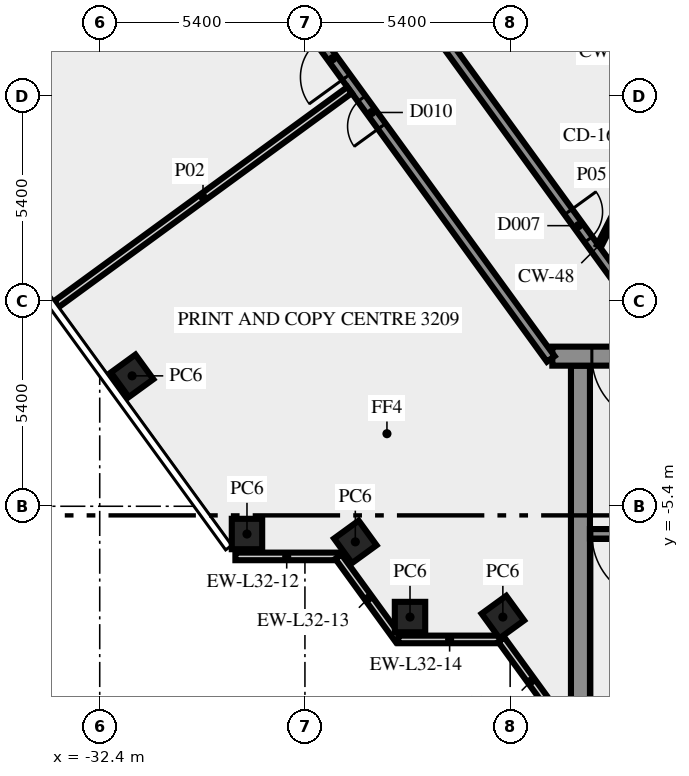
"""IFC4 building model, lengths in metres.
Left out: names, types, materials, properties, quantities, classifications, styles, units other than length and angle.
Written with IfcOpenShell. Run it as: python <this file> out.ifc"""

import sys

from ifc_helpers import new_model, si_unit, direction, frame, frame_2d, origin, origin_2d, place, context, subcontext, project, spatial, rectangle, extrude, element, fill, save


model = new_model("IFC4")
c1 = context("Model", 3, precision=1e-05, world=origin(), true_north=direction((0.0, 1.0)))
c2 = subcontext(c1, "Body", "Model", "MODEL_VIEW")
j1 = project(units=[si_unit("LENGTHUNIT", "METRE"), si_unit("PLANEANGLEUNIT", "RADIAN")], contexts=[c1])
p1 = place(None, origin())
s1 = spatial("IfcSite", under=j1, at=p1, CompositionType="ELEMENT")
p2 = place(p1, origin())
s2 = spatial("IfcBuilding", under=s1, at=p2, CompositionType="ELEMENT")
p3 = place(p2, frame((0.0, 0.0, 139.0)))
s3 = spatial("IfcBuildingStorey", under=s2, at=p3, CompositionType="ELEMENT", Elevation=139.0)
for number, where, z_axis, x_axis in (
    (1, (-31.548, -1.969, 0.0), (0.0, 0.0, 1.0), (0.588, -0.809, 0.0)),
    (2, (-28.525, -6.13, 0.0), (0.0, 0.0, 1.0), (1.0, 0.0, 0.0)),
    (3, (-25.674, -6.337, 0.0), (0.0, 0.0, 1.0), (0.588, -0.809, 0.0)),
    (4, (-24.235, -8.315, 0.0), (0.0, 0.0, 1.0), (1.0, 0.0, 0.0)),
    (5, (-21.792, -8.315, 0.0), (0.0, 0.0, 1.0), (0.588, -0.809, 0.0)),
):
    element("IfcColumn", number, at=place(p3, frame(where, z_axis=z_axis, x_axis=x_axis)), inside=s3, PredefinedType="COLUMN", context=c2, shape_type="SweptSolid", body=[
        extrude(rectangle(XDim=0.8, YDim=0.8, at=origin_2d()), origin(), (0.0, 0.0, 1.0), 4.65),
    ])
p4 = place(p3, frame((-28.83, -6.719, 0.0), z_axis=(0.0, 0.0, 1.0), x_axis=(1.0, 0.0, 0.0)))
e6 = element("IfcWall", 6, at=p4, inside=s3, PredefinedType="SOLIDWALL", context=c2, shape_type="SweptSolid", body=[
    extrude(rectangle(XDim=2.7, YDim=0.2, at=frame_2d((1.35, 0.0))), origin(), (0.0, 0.0, 1.0), 4.65),
])
p5 = place(p3, frame((-26.12, -6.724, 0.0), z_axis=(0.0, 0.0, 1.0), x_axis=(0.587720002413, -0.809064397168, 0.0)))
e7 = element("IfcWall", 7, at=p5, inside=s3, PredefinedType="SOLIDWALL", context=c2, shape_type="SweptSolid", body=[
    extrude(rectangle(XDim=2.7, YDim=0.2, at=frame_2d((1.35, 0.0))), origin(), (0.0, 0.0, 1.0), 4.65),
])
p6 = place(p3, frame((-24.543, -8.904, 0.0), z_axis=(0.0, 0.0, 1.0), x_axis=(1.0, 0.0, 0.0)))
e8 = element("IfcWall", 8, at=p6, inside=s3, PredefinedType="SOLIDWALL", context=c2, shape_type="SweptSolid", body=[
    extrude(rectangle(XDim=2.7, YDim=0.2, at=frame_2d((1.35, 0.0))), origin(), (0.0, 0.0, 1.0), 4.65),
])
p7 = place(p3, frame((-21.833, -8.909, 0.0), z_axis=(0.0, 0.0, 1.0), x_axis=(0.587766567315, -0.809030569476, 0.0)))
e9 = element("IfcWall", 9, at=p7, inside=s3, PredefinedType="SOLIDWALL", context=c2, shape_type="SweptSolid", body=[
    extrude(rectangle(XDim=2.688, YDim=0.2, at=frame_2d((1.344, 0.0))), origin(), (0.0, 0.0, 1.0), 4.65),
])
p8 = place(p3, frame((-19.75, -10.5, 0.0), z_axis=(0.0, 0.0, 1.0), x_axis=(0.0, 1.0, 0.0)))
e10 = element("IfcWall", 10, at=p8, inside=s3, PredefinedType="SHEAR", context=c2, shape_type="SweptSolid", body=[
    extrude(rectangle(XDim=8.8, YDim=0.5, at=frame_2d((4.4, 0.0))), origin(), (0.0, 0.0, 1.0), 4.65),
])
p9 = place(p3, frame((-11.45, -6.125, 0.0), z_axis=(0.0, 0.0, 1.0), x_axis=(-1.0, 0.0, 0.0)))
e11 = element("IfcWall", 11, at=p9, inside=s3, PredefinedType="SHEAR", context=c2, shape_type="SweptSolid", body=[
    extrude(rectangle(XDim=8.05, YDim=0.25, at=frame_2d((4.025, 0.0))), origin(), (0.0, 0.0, 1.0), 4.65),
])
p10 = place(p9, frame((6.2, 0.0, 0.0)))
e12 = element("IfcOpeningElement", 12, at=p10, cuts=e11, PredefinedType="OPENING", context=c2, shape_type="SweptSolid", body=[
    extrude(rectangle(XDim=1.8, YDim=2.1, at=frame_2d((0.9, 1.05))), frame((0.0, 0.135, 0.0), z_axis=(0.0, -1.0, 0.0), x_axis=(1.0, 0.0, 0.0)), (0.0, 0.0, 1.0), 0.27),
])
p11 = place(p3, frame((20.49, -1.45, 0.0), z_axis=(0.0, 0.0, 1.0), x_axis=(-1.0, 0.0, 0.0)))
e13 = element("IfcWall", 13, at=p11, inside=s3, PredefinedType="SHEAR", context=c2, shape_type="SweptSolid", body=[
    extrude(rectangle(XDim=40.98, YDim=0.5, at=frame_2d((20.49, 0.0))), origin(), (0.0, 0.0, 1.0), 4.65),
])
p12 = place(p11, frame((38.14, 0.0, 0.0)))
e14 = element("IfcOpeningElement", 14, at=p12, cuts=e13, PredefinedType="OPENING", context=c2, shape_type="SweptSolid", body=[
    extrude(rectangle(XDim=1.8, YDim=2.1, at=frame_2d((0.9, 1.05))), frame((0.0, 0.26, 0.0), z_axis=(0.0, -1.0, 0.0), x_axis=(1.0, 0.0, 0.0)), (0.0, 0.0, 1.0), 0.52),
])
p13 = place(p11, frame((35.89, 0.0, 0.0)))
e15 = element("IfcOpeningElement", 15, at=p13, cuts=e13, PredefinedType="OPENING", context=c2, shape_type="SweptSolid", body=[
    extrude(rectangle(XDim=0.9, YDim=2.1, at=frame_2d((0.45, 1.05))), frame((0.0, 0.26, 0.0), z_axis=(0.0, -1.0, 0.0), x_axis=(1.0, 0.0, 0.0)), (0.0, 0.0, 1.0), 0.52),
])
p14 = place(p11, frame((32.94, 0.0, 0.0)))
e16 = element("IfcOpeningElement", 16, at=p14, cuts=e13, PredefinedType="OPENING", context=c2, shape_type="SweptSolid", body=[
    extrude(rectangle(XDim=0.9, YDim=2.1, at=frame_2d((0.45, 1.05))), frame((0.0, 0.26, 0.0), z_axis=(0.0, -1.0, 0.0), x_axis=(1.0, 0.0, 0.0)), (0.0, 0.0, 1.0), 0.52),
])
p15 = place(p11, frame((21.765, 0.0, 0.0)))
e17 = element("IfcOpeningElement", 17, at=p15, cuts=e13, PredefinedType="OPENING", context=c2, shape_type="SweptSolid", body=[
    extrude(rectangle(XDim=2.0, YDim=2.1, at=frame_2d((1.0, 1.05))), frame((0.0, 0.26, 0.0), z_axis=(0.0, -1.0, 0.0), x_axis=(1.0, 0.0, 0.0)), (0.0, 0.0, 1.0), 0.52),
])
p16 = place(p11, frame((7.14, 0.0, 0.0)))
e18 = element("IfcOpeningElement", 18, at=p16, cuts=e13, PredefinedType="OPENING", context=c2, shape_type="SweptSolid", body=[
    extrude(rectangle(XDim=0.9, YDim=2.1, at=frame_2d((0.45, 1.05))), frame((0.0, 0.26, 0.0), z_axis=(0.0, -1.0, 0.0), x_axis=(1.0, 0.0, 0.0)), (0.0, 0.0, 1.0), 0.52),
])
p17 = place(p11, frame((5.028, 0.0, 0.0)))
e19 = element("IfcOpeningElement", 19, at=p17, cuts=e13, PredefinedType="OPENING", context=c2, shape_type="SweptSolid", body=[
    extrude(rectangle(XDim=0.8, YDim=2.1, at=frame_2d((0.4, 1.05))), frame((0.0, 0.26, 0.0), z_axis=(0.0, -1.0, 0.0), x_axis=(1.0, 0.0, 0.0)), (0.0, 0.0, 1.0), 0.52),
])
p18 = place(p11, frame((3.452, 0.0, 0.0)))
e20 = element("IfcOpeningElement", 20, at=p18, cuts=e13, PredefinedType="OPENING", context=c2, shape_type="SweptSolid", body=[
    extrude(rectangle(XDim=0.8, YDim=2.1, at=frame_2d((0.4, 1.05))), frame((0.0, 0.26, 0.0), z_axis=(0.0, -1.0, 0.0), x_axis=(1.0, 0.0, 0.0)), (0.0, 0.0, 1.0), 0.52),
])
p19 = place(p11, frame((1.04, 0.0, 0.0)))
e21 = element("IfcOpeningElement", 21, at=p19, cuts=e13, PredefinedType="OPENING", context=c2, shape_type="SweptSolid", body=[
    extrude(rectangle(XDim=1.8, YDim=2.1, at=frame_2d((0.9, 1.05))), frame((0.0, 0.26, 0.0), z_axis=(0.0, -1.0, 0.0), x_axis=(1.0, 0.0, 0.0)), (0.0, 0.0, 1.0), 0.52),
])
p20 = place(p3, frame((-20.531, -1.523, 0.0), z_axis=(0.0, 0.0, 1.0), x_axis=(-0.587781654618, 0.809019608226, 0.0)))
e22 = element("IfcWall", 22, at=p20, inside=s3, PredefinedType="SOLIDWALL", context=c2, shape_type="SweptSolid", body=[
    extrude(rectangle(XDim=33.911, YDim=0.25, at=frame_2d((16.956, 0.0))), origin(), (0.0, 0.0, 1.0), 4.65),
])
p21 = place(p20, frame((9.166, 0.0, 0.0)))
e23 = element("IfcOpeningElement", 23, at=p21, cuts=e22, PredefinedType="OPENING", context=c2, shape_type="SweptSolid", body=[
    extrude(rectangle(XDim=1.2, YDim=2.1, at=frame_2d((0.6, 1.05))), frame((0.0, 0.135, 0.0), z_axis=(0.0, -1.0, 0.0), x_axis=(1.0, 0.0, 0.0)), (0.0, 0.0, 1.0), 0.27),
])
p22 = place(p20, frame((7.566, 0.0, 0.0)))
e24 = element("IfcOpeningElement", 24, at=p22, cuts=e22, PredefinedType="OPENING", context=c2, shape_type="SweptSolid", body=[
    extrude(rectangle(XDim=0.9, YDim=2.1, at=frame_2d((0.45, 1.05))), frame((0.0, 0.135, 0.0), z_axis=(0.0, -1.0, 0.0), x_axis=(1.0, 0.0, 0.0)), (0.0, 0.0, 1.0), 0.27),
])
p23 = place(p3, frame((-38.32, 27.469, 0.0), z_axis=(0.0, 0.0, 1.0), x_axis=(0.587788021768, -0.809014982226, 0.0)))
e25 = element("IfcWall", 25, at=p23, inside=s3, PredefinedType="SOLIDWALL", context=c2, shape_type="SweptSolid", body=[
    extrude(rectangle(XDim=35.344, YDim=0.25, at=frame_2d((17.672, 0.0))), origin(), (0.0, 0.0, 1.0), 4.65),
])
p24 = place(p23, frame((31.052, 0.0, 0.0)))
e26 = element("IfcOpeningElement", 26, at=p24, cuts=e25, PredefinedType="OPENING", context=c2, shape_type="SweptSolid", body=[
    extrude(rectangle(XDim=0.9, YDim=2.1, at=frame_2d((0.45, 1.05))), frame((0.0, 0.135, 0.0), z_axis=(0.0, -1.0, 0.0), x_axis=(1.0, 0.0, 0.0)), (0.0, 0.0, 1.0), 0.27),
])
p25 = place(p23, frame((0.392, 0.0, 0.0)))
e27 = element("IfcOpeningElement", 27, at=p25, cuts=e25, PredefinedType="OPENING", context=c2, shape_type="SweptSolid", body=[
    extrude(rectangle(XDim=0.9, YDim=2.1, at=frame_2d((0.45, 1.05))), frame((0.0, 0.135, 0.0), z_axis=(0.0, -1.0, 0.0), x_axis=(1.0, 0.0, 0.0)), (0.0, 0.0, 1.0), 0.27),
])
p26 = place(p3, frame((-33.538, -0.081, 0.0), z_axis=(0.0, 0.0, 1.0), x_axis=(0.80759810708, 0.589733242612, 0.0)))
e28 = element("IfcWall", 28, at=p26, inside=s3, PredefinedType="SOLIDWALL", context=c2, shape_type="SweptSolid", body=[
    extrude(rectangle(XDim=9.55, YDim=0.2, at=frame_2d((4.775, 0.0))), origin(), (0.0, 0.0, 1.0), 3.85),
])
p27 = place(p3, frame((-19.261, 1.45, 0.0), z_axis=(0.0, 0.0, 1.0), x_axis=(0.453950796792, 0.891026752736, 0.0)))
e29 = element("IfcWall", 29, at=p27, inside=s3, PredefinedType="PARTITIONING", context=c2, shape_type="SweptSolid", body=[
    extrude(rectangle(XDim=2.778, YDim=0.12, at=frame_2d((1.389, 0.0))), origin(), (0.0, 0.0, 1.0), 4.65),
])
p28 = place(p10, origin())
e30 = element("IfcDoor", 30, at=p28, inside=s3, OperationType="DOUBLE_DOOR_SINGLE_SWING", PredefinedType="DOOR", context=c2, shape_type="SweptSolid", body=[
    extrude(rectangle(XDim=1.8, YDim=2.1, at=frame_2d((0.9, 1.05))), frame((0.0, 0.025, 0.0), z_axis=(0.0, -1.0, 0.0), x_axis=(1.0, 0.0, 0.0)), (0.0, 0.0, 1.0), 0.05),
])
fill(e12, e30)
p29 = place(p12, origin())
e31 = element("IfcDoor", 31, at=p29, inside=s3, OperationType="DOUBLE_DOOR_SINGLE_SWING", PredefinedType="DOOR", context=c2, shape_type="SweptSolid", body=[
    extrude(rectangle(XDim=1.8, YDim=2.1, at=frame_2d((0.9, 1.05))), frame((0.0, 0.025, 0.0), z_axis=(0.0, -1.0, 0.0), x_axis=(1.0, 0.0, 0.0)), (0.0, 0.0, 1.0), 0.05),
])
fill(e14, e31)
p30 = place(p21, origin())
e32 = element("IfcDoor", 32, at=p30, inside=s3, OperationType="SINGLE_SWING_LEFT", PredefinedType="DOOR", context=c2, shape_type="SweptSolid", body=[
    extrude(rectangle(XDim=1.2, YDim=2.1, at=frame_2d((0.6, 1.05))), frame((0.0, 0.025, 0.0), z_axis=(0.0, -1.0, 0.0), x_axis=(1.0, 0.0, 0.0)), (0.0, 0.0, 1.0), 0.05),
])
fill(e23, e32)
p31 = place(p24, origin())
e33 = element("IfcDoor", 33, at=p31, inside=s3, OperationType="SINGLE_SWING_RIGHT", PredefinedType="DOOR", context=c2, shape_type="SweptSolid", body=[
    extrude(rectangle(XDim=0.9, YDim=2.1, at=frame_2d((0.45, 1.05))), frame((0.0, 0.025, 0.0), z_axis=(0.0, -1.0, 0.0), x_axis=(1.0, 0.0, 0.0)), (0.0, 0.0, 1.0), 0.05),
])
fill(e26, e33)
p32 = place(p22, origin())
e34 = element("IfcDoor", 34, at=p32, inside=s3, OperationType="SINGLE_SWING_RIGHT", PredefinedType="DOOR", context=c2, shape_type="SweptSolid", body=[
    extrude(rectangle(XDim=0.9, YDim=2.1, at=frame_2d((0.45, 1.05))), frame((0.0, 0.025, 0.0), z_axis=(0.0, -1.0, 0.0), x_axis=(1.0, 0.0, 0.0)), (0.0, 0.0, 1.0), 0.05),
])
fill(e24, e34)
save(model, sys.argv[1])
